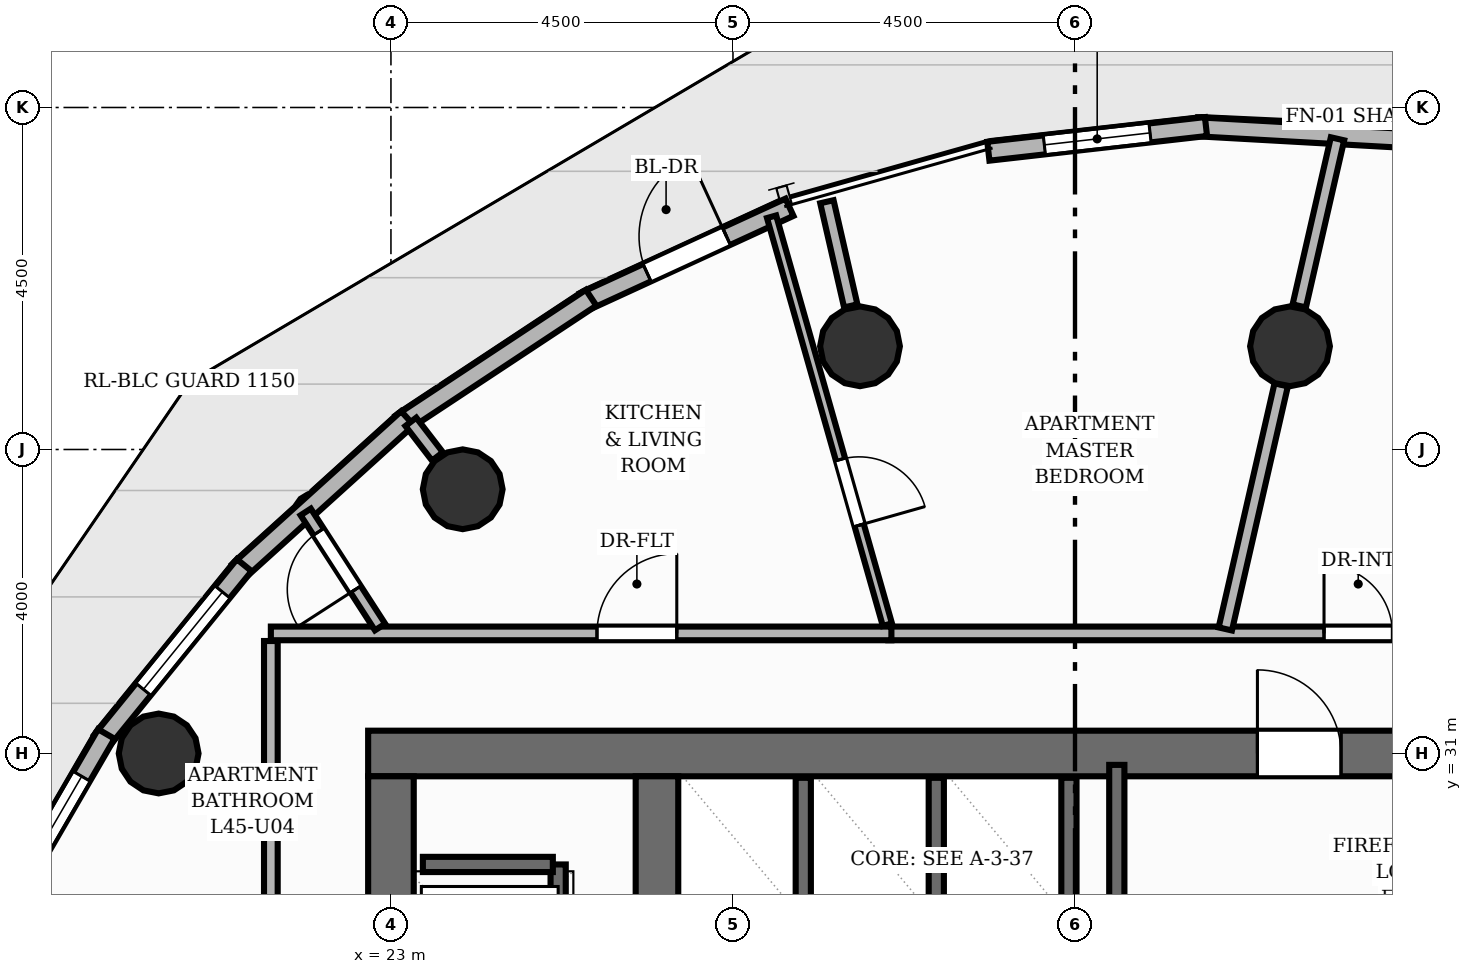
"""IFC4 building model, lengths in metres.
Left out: names, types, materials, properties, quantities, classifications, styles, units other than length and angle.
Written with IfcOpenShell. Run it as: python <this file> out.ifc"""

import sys

from ifc_helpers import new_model, si_unit, direction, frame, frame_2d, origin, origin_2d, place, context, subcontext, project, spatial, rectangle, circle, extrude, element, fill, save


model = new_model("IFC4")
c1 = context("Model", 3, precision=1e-05, world=origin(), true_north=direction((0.0, 1.0)))
c2 = subcontext(c1, "Body", "Model", "MODEL_VIEW")
j1 = project(units=[si_unit("LENGTHUNIT", "METRE"), si_unit("PLANEANGLEUNIT", "RADIAN")], contexts=[c1])
p1 = place(None, origin())
s1 = spatial("IfcSite", under=j1, at=p1, CompositionType="ELEMENT")
p2 = place(p1, origin())
s2 = spatial("IfcBuilding", under=s1, at=p2, CompositionType="ELEMENT")
p3 = place(p2, frame((0.0, 0.0, 152.16)))
s3 = spatial("IfcBuildingStorey", under=s2, at=p3, CompositionType="ELEMENT", Elevation=152.16)
p4 = place(p3, frame((22.7, 31.0, 0.0), z_axis=(0.0, 0.0, 1.0), x_axis=(1.0, 0.0, 0.0)))
e1 = element("IfcWall", 1, at=p4, inside=s3, PredefinedType="SHEAR", context=c2, shape_type="SweptSolid", body=[
    extrude(rectangle(XDim=15.1, YDim=0.6, at=frame_2d((7.55, 0.0))), origin(), (0.0, 0.0, 1.0), 3.2),
])
p5 = place(p4, frame((11.7, 0.0, 0.0)))
e2 = element("IfcOpeningElement", 2, at=p5, cuts=e1, PredefinedType="OPENING", context=c2, shape_type="SweptSolid", body=[
    extrude(rectangle(XDim=1.1, YDim=2.15, at=frame_2d((0.55, 1.075))), frame((0.0, 0.31, 0.0), z_axis=(0.0, -1.0, 0.0), x_axis=(1.0, 0.0, 0.0)), (0.0, 0.0, 1.0), 0.62),
])
p6 = place(p3, frame((23.0, 17.3, 0.0), z_axis=(0.0, 0.0, 1.0), x_axis=(0.0, 1.0, 0.0)))
e3 = element("IfcWall", 3, at=p6, inside=s3, PredefinedType="SHEAR", context=c2, shape_type="SweptSolid", body=[
    extrude(rectangle(XDim=13.4, YDim=0.6, at=frame_2d((6.7, 0.0))), origin(), (0.0, 0.0, 1.0), 3.2),
])
p7 = place(p6, frame((1.675, 0.0, 0.0)))
e4 = element("IfcOpeningElement", 4, at=p7, cuts=e3, PredefinedType="OPENING", context=c2, shape_type="SweptSolid", body=[
    extrude(rectangle(XDim=1.05, YDim=2.15, at=frame_2d((0.525, 1.075))), frame((0.0, 0.31, 0.0), z_axis=(0.0, -1.0, 0.0), x_axis=(1.0, 0.0, 0.0)), (0.0, 0.0, 1.0), 0.62),
])
p8 = place(p6, frame((6.175, 0.0, 0.0)))
e5 = element("IfcOpeningElement", 5, at=p8, cuts=e3, PredefinedType="OPENING", context=c2, shape_type="SweptSolid", body=[
    extrude(rectangle(XDim=1.05, YDim=2.15, at=frame_2d((0.525, 1.075))), frame((0.0, 0.31, 0.0), z_axis=(0.0, -1.0, 0.0), x_axis=(1.0, 0.0, 0.0)), (0.0, 0.0, 1.0), 0.62),
])
p9 = place(p6, frame((10.675, 0.0, 0.0)))
e6 = element("IfcOpeningElement", 6, at=p9, cuts=e3, PredefinedType="OPENING", context=c2, shape_type="SweptSolid", body=[
    extrude(rectangle(XDim=1.05, YDim=2.15, at=frame_2d((0.525, 1.075))), frame((0.0, 0.31, 0.0), z_axis=(0.0, -1.0, 0.0), x_axis=(1.0, 0.0, 0.0)), (0.0, 0.0, 1.0), 0.62),
])
p10 = place(p3, frame((26.5, 17.3, 0.0), z_axis=(0.0, 0.0, 1.0), x_axis=(0.0, 1.0, 0.0)))
e7 = element("IfcWall", 7, at=p10, inside=s3, PredefinedType="SHEAR", context=c2, shape_type="SweptSolid", body=[
    extrude(rectangle(XDim=13.4, YDim=0.56, at=frame_2d((6.7, 0.0))), origin(), (0.0, 0.0, 1.0), 3.2),
])
for number, where, z_axis, x_axis in (
    (8, (34.829, 36.358, 0.0), (0.0, 0.0, 1.0), (1.0, 0.0, 0.0)),
    (9, (29.171, 36.358, 0.0), (0.0, 0.0, 1.0), (1.0, 0.0, 0.0)),
    (10, (23.944, 34.477, 0.0), (0.0, 0.0, 1.0), (1.0, 0.0, 0.0)),
    (11, (19.944, 31.0, 0.0), (0.0, 0.0, 1.0), (1.0, 0.0, 0.0)),
):
    element("IfcColumn", number, at=place(p3, frame(where, z_axis=z_axis, x_axis=x_axis)), inside=s3, PredefinedType="COLUMN", context=c2, shape_type="SweptSolid", body=[
        extrude(circle(Radius=0.525, at=origin_2d()), origin(), (0.0, 0.0, 1.0), 3.2),
    ])
p11 = place(p3, frame((33.613, 39.246, 0.0), z_axis=(0.0, 0.0, 1.0), x_axis=(0.998436800423, -0.055892356906, 0.0)))
e12 = element("IfcWall", 12, at=p11, inside=s3, PredefinedType="SOLIDWALL", context=c2, shape_type="SweptSolid", body=[
    extrude(rectangle(XDim=2.817, YDim=0.25, at=frame_2d((1.409, 0.0))), origin(), (0.0, 0.0, 1.0), 2.96),
])
p12 = place(p3, frame((30.86, 38.924, 0.0), z_axis=(0.0, 0.0, 1.0), x_axis=(0.993631150985, 0.112681568111, 0.0)))
e13 = element("IfcWall", 13, at=p12, inside=s3, PredefinedType="SOLIDWALL", context=c2, shape_type="SweptSolid", body=[
    extrude(rectangle(XDim=2.882, YDim=0.25, at=frame_2d((1.441, 0.0))), origin(), (0.0, 0.0, 1.0), 2.96),
])
p13 = place(p12, frame((0.741, 0.0, 0.85)))
e14 = element("IfcOpeningElement", 14, at=p13, cuts=e13, PredefinedType="OPENING", context=c2, shape_type="SweptSolid", body=[
    extrude(rectangle(XDim=1.4, YDim=1.55, at=frame_2d((0.7, 0.775))), frame((0.0, 0.135, 0.0), z_axis=(0.0, -1.0, 0.0), x_axis=(1.0, 0.0, 0.0)), (0.0, 0.0, 1.0), 0.27),
])
p14 = place(p3, frame((25.539, 36.944, 0.0), z_axis=(0.0, 0.0, 1.0), x_axis=(0.908594420046, 0.417679518124, 0.0)))
e15 = element("IfcWall", 15, at=p14, inside=s3, PredefinedType="SOLIDWALL", context=c2, shape_type="SweptSolid", body=[
    extrude(rectangle(XDim=2.977, YDim=0.25, at=frame_2d((1.489, 0.0))), origin(), (0.0, 0.0, 1.0), 2.96),
])
p15 = place(p14, frame((0.914, 0.0, 0.0)))
e16 = element("IfcOpeningElement", 16, at=p15, cuts=e15, PredefinedType="OPENING", context=c2, shape_type="SweptSolid", body=[
    extrude(rectangle(XDim=1.15, YDim=2.2, at=frame_2d((0.575, 1.1))), frame((0.0, 0.135, 0.0), z_axis=(0.0, -1.0, 0.0), x_axis=(1.0, 0.0, 0.0)), (0.0, 0.0, 1.0), 0.27),
])
p16 = place(p3, frame((23.132, 35.344, 0.0), z_axis=(0.0, 0.0, 1.0), x_axis=(0.83436073477, 0.551218798912, 0.0)))
e17 = element("IfcWall", 17, at=p16, inside=s3, PredefinedType="SOLIDWALL", context=c2, shape_type="SweptSolid", body=[
    extrude(rectangle(XDim=2.998, YDim=0.25, at=frame_2d((1.499, 0.0))), origin(), (0.0, 0.0, 1.0), 2.96),
])
p17 = place(p3, frame((20.995, 33.398, 0.0), z_axis=(0.0, 0.0, 1.0), x_axis=(0.741367932595, 0.671098791922, 0.0)))
e18 = element("IfcWall", 18, at=p17, inside=s3, PredefinedType="SOLIDWALL", context=c2, shape_type="SweptSolid", body=[
    extrude(rectangle(XDim=2.998, YDim=0.25, at=frame_2d((1.499, 0.0))), origin(), (0.0, 0.0, 1.0), 2.96),
])
p18 = place(p3, frame((19.193, 31.167, 0.0), z_axis=(0.0, 0.0, 1.0), x_axis=(0.630478385784, 0.776206805599, 0.0)))
e19 = element("IfcWall", 19, at=p18, inside=s3, PredefinedType="SOLIDWALL", context=c2, shape_type="SweptSolid", body=[
    extrude(rectangle(XDim=2.977, YDim=0.25, at=frame_2d((1.489, 0.0))), origin(), (0.0, 0.0, 1.0), 2.96),
])
p19 = place(p18, frame((0.873, 0.0, 0.85)))
e20 = element("IfcOpeningElement", 20, at=p19, cuts=e19, PredefinedType="OPENING", context=c2, shape_type="SweptSolid", body=[
    extrude(rectangle(XDim=1.65, YDim=1.55, at=frame_2d((0.825, 0.775))), frame((0.0, 0.135, 0.0), z_axis=(0.0, -1.0, 0.0), x_axis=(1.0, 0.0, 0.0)), (0.0, 0.0, 1.0), 0.27),
])
p20 = place(p3, frame((17.781, 28.717, 0.0), z_axis=(0.0, 0.0, 1.0), x_axis=(0.502009170613, 0.864862296912, 0.0)))
e21 = element("IfcWall", 21, at=p20, inside=s3, PredefinedType="SOLIDWALL", context=c2, shape_type="SweptSolid", body=[
    extrude(rectangle(XDim=2.937, YDim=0.25, at=frame_2d((1.469, 0.0))), origin(), (0.0, 0.0, 1.0), 2.96),
])
p21 = place(p20, frame((0.643, 0.0, 0.85)))
e22 = element("IfcOpeningElement", 22, at=p21, cuts=e21, PredefinedType="OPENING", context=c2, shape_type="SweptSolid", body=[
    extrude(rectangle(XDim=1.65, YDim=1.55, at=frame_2d((0.825, 0.775))), frame((0.0, 0.135, 0.0), z_axis=(0.0, -1.0, 0.0), x_axis=(1.0, 0.0, 0.0)), (0.0, 0.0, 1.0), 0.27),
])
p22 = place(p3, frame((32.55, 27.35, 0.0), z_axis=(0.0, 0.0, 1.0), x_axis=(0.0, 1.0, 0.0)))
e23 = element("IfcWall", 23, at=p22, inside=s3, PredefinedType="SHEAR", context=c2, shape_type="SweptSolid", body=[
    extrude(rectangle(XDim=3.5, YDim=0.2, at=frame_2d((1.75, 0.0))), origin(), (0.0, 0.0, 1.0), 3.2),
])
p23 = place(p3, frame((25.2, 18.46, 0.0), z_axis=(0.0, 0.0, 1.0), x_axis=(0.0, 1.0, 0.0)))
e24 = element("IfcWall", 24, at=p23, inside=s3, PredefinedType="SHEAR", context=c2, shape_type="SweptSolid", body=[
    extrude(rectangle(XDim=11.08, YDim=0.2, at=frame_2d((5.54, 0.0))), origin(), (0.0, 0.0, 1.0), 3.2),
])
p24 = place(p3, frame((23.42, 29.54, 0.0), z_axis=(0.0, 0.0, 1.0), x_axis=(1.0, 0.0, 0.0)))
e25 = element("IfcWall", 25, at=p24, inside=s3, PredefinedType="SHEAR", context=c2, shape_type="SweptSolid", body=[
    extrude(rectangle(XDim=1.71, YDim=0.2, at=frame_2d((0.855, 0.0))), origin(), (0.0, 0.0, 1.0), 3.2),
])
for number, where, z_axis, x_axis in (
    (26, (31.92, 29.02, 0.0), (0.0, 0.0, 1.0), (0.0, 1.0, 0.0)),
    (27, (28.425, 29.02, 0.0), (0.0, 0.0, 1.0), (0.0, 1.0, 0.0)),
    (28, (30.175, 29.02, 0.0), (0.0, 0.0, 1.0), (0.0, 1.0, 0.0)),
):
    element("IfcWall", number, at=place(p3, frame(where, z_axis=z_axis, x_axis=x_axis)), inside=s3, PredefinedType="SHEAR", context=c2, shape_type="SweptSolid", body=[
        extrude(rectangle(XDim=1.66, YDim=0.2, at=frame_2d((0.83, 0.0))), origin(), (0.0, 0.0, 1.0), 3.2),
    ])
p25 = place(p3, frame((34.95, 36.889, 0.0), z_axis=(0.0, 0.0, 1.0), x_axis=(0.223104026265, 0.974794641688, 0.0)))
e29 = element("IfcWall", 29, at=p25, inside=s3, PredefinedType="PARTITIONING", context=c2, shape_type="SweptSolid", body=[
    extrude(rectangle(XDim=2.255, YDim=0.18, at=frame_2d((1.128, 0.0))), origin(), (0.0, 0.0, 1.0), 2.336),
])
p26 = place(p3, frame((29.05, 36.889, 0.0), z_axis=(0.0, 0.0, 1.0), x_axis=(-0.223121817242, 0.974790569646, 0.0)))
e30 = element("IfcWall", 30, at=p26, inside=s3, PredefinedType="PARTITIONING", context=c2, shape_type="SweptSolid", body=[
    extrude(rectangle(XDim=1.406, YDim=0.18, at=frame_2d((0.703, 0.0))), origin(), (0.0, 0.0, 1.0), 2.336),
])
p27 = place(p3, frame((23.612, 34.908, 0.0), z_axis=(0.0, 0.0, 1.0), x_axis=(-0.609608105511, 0.79270294417, 0.0)))
e31 = element("IfcWall", 31, at=p27, inside=s3, PredefinedType="PARTITIONING", context=c2, shape_type="SweptSolid", body=[
    extrude(rectangle(XDim=0.575, YDim=0.18, at=frame_2d((0.287, 0.0))), origin(), (0.0, 0.0, 1.0), 2.336),
])
p28 = place(p3, frame((29.544, 32.58, 0.0), z_axis=(0.0, 0.0, 1.0), x_axis=(1.0, 0.0, 0.0)))
e32 = element("IfcWall", 32, at=p28, inside=s3, PredefinedType="PARTITIONING", context=c2, shape_type="SweptSolid", body=[
    extrude(rectangle(XDim=9.536, YDim=0.18, at=frame_2d((4.768, 0.0))), origin(), (0.0, 0.0, 1.0), 2.955),
])
p29 = place(p28, frame((5.733, 0.0, 0.0)))
e33 = element("IfcOpeningElement", 33, at=p29, cuts=e32, PredefinedType="OPENING", context=c2, shape_type="SweptSolid", body=[
    extrude(rectangle(XDim=0.9, YDim=2.1, at=frame_2d((0.45, 1.05))), frame((0.0, 0.1, 0.0), z_axis=(0.0, -1.0, 0.0), x_axis=(1.0, 0.0, 0.0)), (0.0, 0.0, 1.0), 0.2),
])
p30 = place(p3, frame((21.42, 32.58, 0.0), z_axis=(0.0, 0.0, 1.0), x_axis=(1.0, 0.0, 0.0)))
e34 = element("IfcWall", 34, at=p30, inside=s3, PredefinedType="PARTITIONING", context=c2, shape_type="SweptSolid", body=[
    extrude(rectangle(XDim=8.165, YDim=0.18, at=frame_2d((4.082, 0.0))), origin(), (0.0, 0.0, 1.0), 2.955),
])
p31 = place(p30, frame((4.291, 0.0, 0.0)))
e35 = element("IfcOpeningElement", 35, at=p31, cuts=e34, PredefinedType="OPENING", context=c2, shape_type="SweptSolid", body=[
    extrude(rectangle(XDim=1.05, YDim=2.15, at=frame_2d((0.525, 1.075))), frame((0.0, 0.1, 0.0), z_axis=(0.0, -1.0, 0.0), x_axis=(1.0, 0.0, 0.0)), (0.0, 0.0, 1.0), 0.2),
])
p32 = place(p3, frame((21.42, 26.4, 0.0), z_axis=(0.0, 0.0, 1.0), x_axis=(0.0, 1.0, 0.0)))
e36 = element("IfcWall", 36, at=p32, inside=s3, PredefinedType="PARTITIONING", context=c2, shape_type="SweptSolid", body=[
    extrude(rectangle(XDim=6.08, YDim=0.18, at=frame_2d((3.04, 0.0))), origin(), (0.0, 0.0, 1.0), 2.955),
])
p33 = place(p3, frame((33.977, 32.638, 0.0), z_axis=(0.0, 0.0, 1.0), x_axis=(0.22319287001, 0.974774303506, 0.0)))
e37 = element("IfcWall", 37, at=p33, inside=s3, PredefinedType="PARTITIONING", context=c2, shape_type="SweptSolid", body=[
    extrude(rectangle(XDim=3.296, YDim=0.18, at=frame_2d((1.648, 0.0))), origin(), (0.0, 0.0, 1.0), 2.336),
])
p34 = place(p3, frame((22.857, 32.664, 0.0), z_axis=(0.0, 0.0, 1.0), x_axis=(-0.542638936207, 0.839966061762, 0.0)))
e38 = element("IfcWall", 38, at=p34, inside=s3, PredefinedType="PLUMBINGWALL", context=c2, shape_type="SweptSolid", body=[
    extrude(rectangle(XDim=1.802, YDim=0.16, at=frame_2d((0.901, 0.0))), origin(), (0.0, 0.0, 1.0), 2.692),
])
p35 = place(p34, frame((0.591, 0.0, 0.0)))
e39 = element("IfcOpeningElement", 39, at=p35, cuts=e38, PredefinedType="OPENING", context=c2, shape_type="SweptSolid", body=[
    extrude(rectangle(XDim=0.9, YDim=2.1, at=frame_2d((0.45, 1.05))), frame((0.0, 0.09, 0.0), z_axis=(0.0, -1.0, 0.0), x_axis=(1.0, 0.0, 0.0)), (0.0, 0.0, 1.0), 0.18),
])
p36 = place(p3, frame((28.008, 38.062, 0.0), z_axis=(0.0, 0.0, 1.0), x_axis=(0.273056222603, -0.961998076556, 0.0)))
e40 = element("IfcWall", 40, at=p36, inside=s3, PredefinedType="PARTITIONING", context=c2, shape_type="SweptSolid", body=[
    extrude(rectangle(XDim=5.579, YDim=0.125, at=frame_2d((2.79, 0.0))), origin(), (0.0, 0.0, 1.0), 2.955),
])
p37 = place(p36, frame((3.32, 0.0, 0.0)))
e41 = element("IfcOpeningElement", 41, at=p37, cuts=e40, PredefinedType="OPENING", context=c2, shape_type="SweptSolid", body=[
    extrude(rectangle(XDim=0.9, YDim=2.1, at=frame_2d((0.45, 1.05))), frame((0.0, 0.073, 0.0), z_axis=(0.0, -1.0, 0.0), x_axis=(1.0, 0.0, 0.0)), (0.0, 0.0, 1.0), 0.145),
])
p38 = place(p3, frame((21.333, 30.193, 0.0), z_axis=(0.0, 0.0, 1.0), x_axis=(-0.864719901707, 0.50225440923, 0.0)))
e42 = element("IfcWall", 42, at=p38, inside=s3, PredefinedType="PLUMBINGWALL", context=c2, shape_type="SweptSolid", body=[
    extrude(rectangle(XDim=1.09, YDim=0.16, at=frame_2d((0.545, 0.0))), origin(), (0.0, 0.0, 1.0), 2.336),
])
p39 = place(p15, origin())
e43 = element("IfcDoor", 43, at=p39, inside=s3, OperationType="SINGLE_SWING_RIGHT", PredefinedType="DOOR", context=c2, shape_type="SweptSolid", body=[
    extrude(rectangle(XDim=1.15, YDim=2.2, at=frame_2d((0.575, 1.1))), frame((0.0, 0.025, 0.0), z_axis=(0.0, -1.0, 0.0), x_axis=(1.0, 0.0, 0.0)), (0.0, 0.0, 1.0), 0.05),
])
fill(e16, e43)
p40 = place(p13, origin())
e44 = element("IfcWindow", 44, at=p40, inside=s3, PartitioningType="SINGLE_PANEL", PredefinedType="WINDOW", context=c2, shape_type="SweptSolid", body=[
    extrude(rectangle(XDim=1.4, YDim=1.55, at=frame_2d((0.7, 0.775))), frame((0.0, 0.03, 0.0), z_axis=(0.0, -1.0, 0.0), x_axis=(1.0, 0.0, 0.0)), (0.0, 0.0, 1.0), 0.06),
])
fill(e14, e44)
p41 = place(p19, origin())
e45 = element("IfcWindow", 45, at=p41, inside=s3, PartitioningType="SINGLE_PANEL", PredefinedType="WINDOW", context=c2, shape_type="SweptSolid", body=[
    extrude(rectangle(XDim=1.65, YDim=1.55, at=frame_2d((0.825, 0.775))), frame((0.0, 0.03, 0.0), z_axis=(0.0, -1.0, 0.0), x_axis=(1.0, 0.0, 0.0)), (0.0, 0.0, 1.0), 0.06),
])
fill(e20, e45)
p42 = place(p21, origin())
e46 = element("IfcWindow", 46, at=p42, inside=s3, PartitioningType="SINGLE_PANEL", PredefinedType="WINDOW", context=c2, shape_type="SweptSolid", body=[
    extrude(rectangle(XDim=1.65, YDim=1.55, at=frame_2d((0.825, 0.775))), frame((0.0, 0.03, 0.0), z_axis=(0.0, -1.0, 0.0), x_axis=(1.0, 0.0, 0.0)), (0.0, 0.0, 1.0), 0.06),
])
fill(e22, e46)
p43 = place(p5, origin())
e47 = element("IfcDoor", 47, at=p43, inside=s3, OperationType="SINGLE_SWING_LEFT", PredefinedType="DOOR", context=c2, shape_type="SweptSolid", body=[
    extrude(rectangle(XDim=1.1, YDim=2.15, at=frame_2d((0.55, 1.075))), frame((0.0, 0.025, 0.0), z_axis=(0.0, -1.0, 0.0), x_axis=(1.0, 0.0, 0.0)), (0.0, 0.0, 1.0), 0.05),
])
fill(e2, e47)
p44 = place(p29, origin())
e48 = element("IfcDoor", 48, at=p44, inside=s3, OperationType="SINGLE_SWING_LEFT", PredefinedType="DOOR", context=c2, shape_type="SweptSolid", body=[
    extrude(rectangle(XDim=0.9, YDim=2.1, at=frame_2d((0.45, 1.05))), frame((0.0, 0.025, 0.0), z_axis=(0.0, -1.0, 0.0), x_axis=(1.0, 0.0, 0.0)), (0.0, 0.0, 1.0), 0.05),
])
fill(e33, e48)
p45 = place(p31, origin())
e49 = element("IfcDoor", 49, at=p45, inside=s3, OperationType="SINGLE_SWING_RIGHT", PredefinedType="DOOR", context=c2, shape_type="SweptSolid", body=[
    extrude(rectangle(XDim=1.05, YDim=2.15, at=frame_2d((0.525, 1.075))), frame((0.0, 0.025, 0.0), z_axis=(0.0, -1.0, 0.0), x_axis=(1.0, 0.0, 0.0)), (0.0, 0.0, 1.0), 0.05),
])
fill(e35, e49)
p46 = place(p35, origin())
e50 = element("IfcDoor", 50, at=p46, inside=s3, OperationType="SINGLE_SWING_LEFT", PredefinedType="DOOR", context=c2, shape_type="SweptSolid", body=[
    extrude(rectangle(XDim=0.9, YDim=2.1, at=frame_2d((0.45, 1.05))), frame((0.0, 0.025, 0.0), z_axis=(0.0, -1.0, 0.0), x_axis=(1.0, 0.0, 0.0)), (0.0, 0.0, 1.0), 0.05),
])
fill(e39, e50)
p47 = place(p37, origin())
e51 = element("IfcDoor", 51, at=p47, inside=s3, OperationType="SINGLE_SWING_RIGHT", PredefinedType="DOOR", context=c2, shape_type="SweptSolid", body=[
    extrude(rectangle(XDim=0.9, YDim=2.1, at=frame_2d((0.45, 1.05))), frame((0.0, 0.025, 0.0), z_axis=(0.0, -1.0, 0.0), x_axis=(1.0, 0.0, 0.0)), (0.0, 0.0, 1.0), 0.05),
])
fill(e41, e51)
save(model, sys.argv[1])
